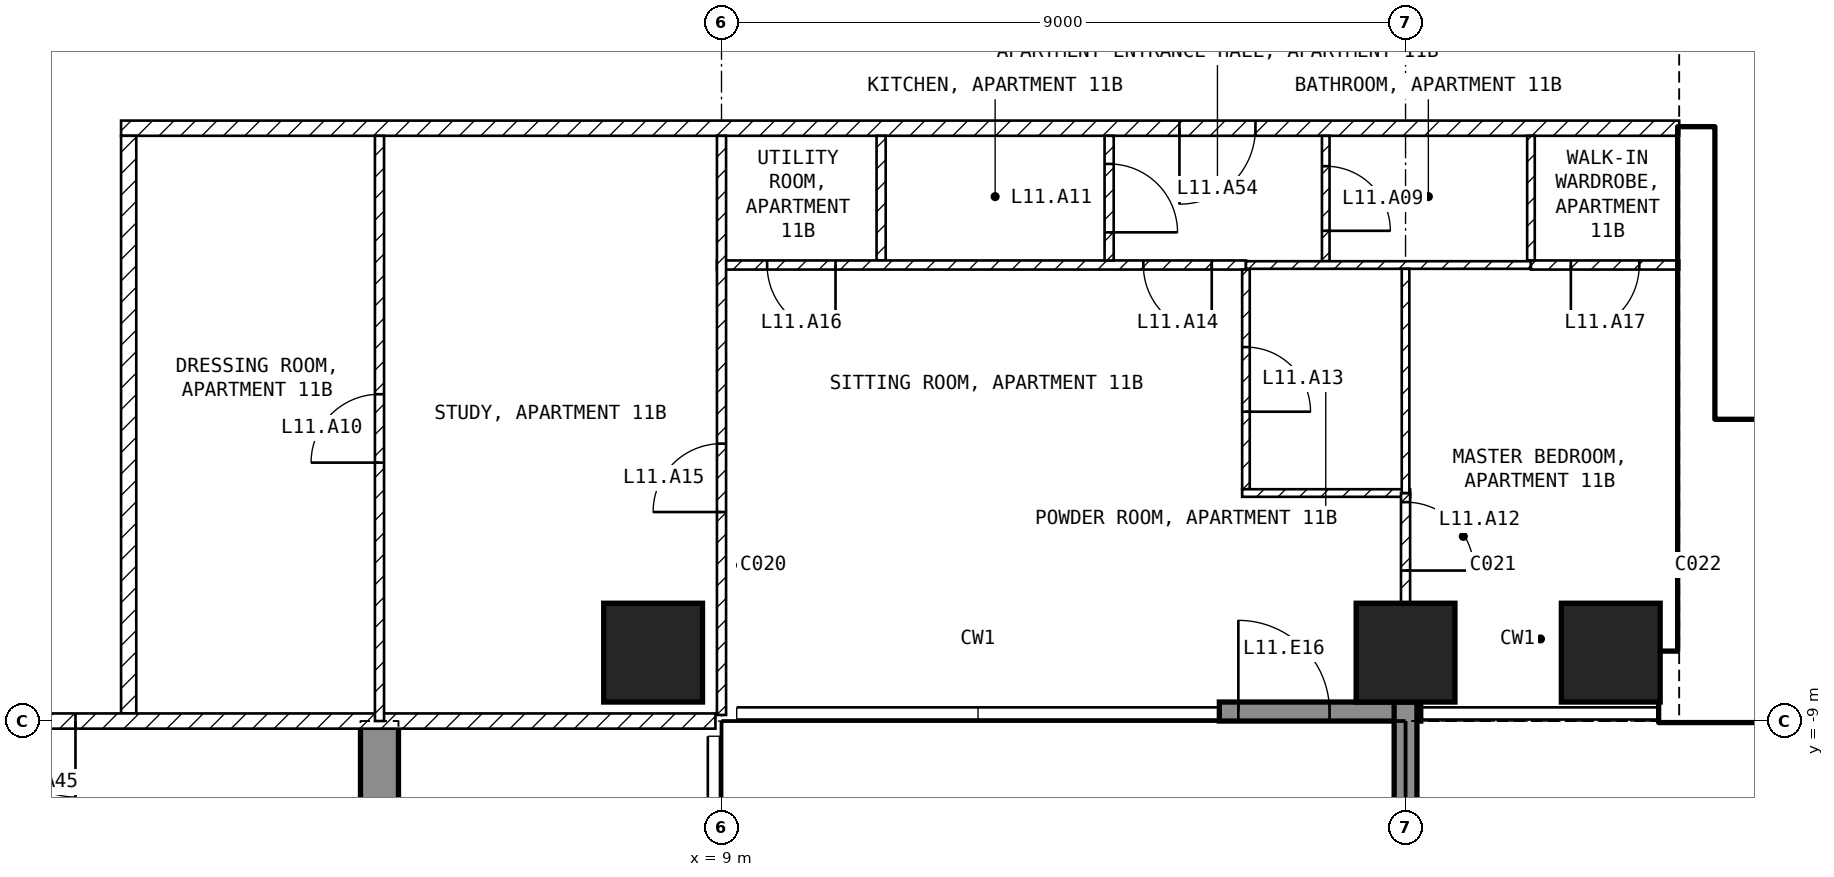
"""IFC4 building model, lengths in metres.
Left out: names, types, materials, properties, quantities, classifications, styles, units other than length and angle.
Written with IfcOpenShell. Run it as: python <this file> out.ifc"""

import sys

from ifc_helpers import new_model, si_unit, direction, frame, frame_2d, origin, origin_2d, place, context, subcontext, project, spatial, polyline, rectangle, outline, extrude, element, fill, save


model = new_model("IFC4")
c1 = context("Model", 3, precision=1e-05, world=origin(), true_north=direction((0.0, 1.0)))
c2 = subcontext(c1, "Body", "Model", "MODEL_VIEW")
j1 = project(units=[si_unit("LENGTHUNIT", "METRE"), si_unit("PLANEANGLEUNIT", "RADIAN")], contexts=[c1])
p1 = place(None, origin())
s1 = spatial("IfcSite", under=j1, at=p1, CompositionType="ELEMENT")
p2 = place(p1, origin())
s2 = spatial("IfcBuilding", under=s1, at=p2, CompositionType="ELEMENT")
p3 = place(p2, frame((0.0, 0.0, 57.5)))
s3 = spatial("IfcBuildingStorey", under=s2, at=p3, CompositionType="ELEMENT", Elevation=57.5)
for number, where, z_axis, x_axis in (
    (1, (8.1, -8.1, -0.25), (0.0, 0.0, 1.0), (1.0, 0.0, 0.0)),
    (2, (18.0, -8.1, -0.25), (0.0, 0.0, 1.0), (1.0, 0.0, 0.0)),
    (3, (20.7, -8.1, -0.25), (0.0, 0.0, 1.0), (1.0, 0.0, 0.0)),
):
    element("IfcColumn", number, at=place(p3, frame(where, z_axis=z_axis, x_axis=x_axis)), inside=s3, PredefinedType="COLUMN", context=c2, shape_type="SweptSolid", body=[
        extrude(rectangle(XDim=1.3, YDim=1.3, at=origin_2d()), origin(), (0.0, 0.0, 1.0), 3.5),
    ])
p4 = place(p3, frame((4.25, -25.45, -0.25), z_axis=(1.0, 0.0, 0.0), x_axis=(0.0, 1.0, 0.0)))
e4 = element("IfcWall", 4, at=p4, inside=s3, PredefinedType="SHEAR", context=c2, shape_type="SweptSolid", body=[
    extrude(outline(polyline([(0.0, 0.0), (4.15, 0.0), (4.15, 2.65), (6.55, 2.65), (6.55, 0.0), (11.95, 0.0), (11.95, 2.65), (14.35, 2.65), (14.35, 0.0), (16.45, 0.0), (16.45, 3.5), (0.0, 3.5), (0.0, 0.0)])), origin(), (0.0, 0.0, 1.0), 0.5),
])
p5 = place(p3, frame((15.55, -8.875, 0.0), z_axis=(0.0, 0.0, 1.0), x_axis=(1.0, 0.0, 0.0)))
e5 = element("IfcWall", 5, at=p5, inside=s3, PredefinedType="SOLIDWALL", context=c2, shape_type="SweptSolid", body=[
    extrude(rectangle(XDim=2.65, YDim=0.25, at=frame_2d((1.325, 0.0))), origin(), (0.0, 0.0, 1.0), 3.25),
])
p6 = place(p5, frame((0.25, 0.0, 0.0)))
e6 = element("IfcOpeningElement", 6, at=p6, cuts=e5, PredefinedType="OPENING", context=c2, shape_type="SweptSolid", body=[
    extrude(rectangle(XDim=1.2, YDim=2.4, at=frame_2d((0.6, 1.2))), frame((0.0, 0.135, 0.0), z_axis=(0.0, -1.0, 0.0), x_axis=(1.0, 0.0, 0.0)), (0.0, 0.0, 1.0), 0.27),
])
p7 = place(p3, frame((18.0, -8.75, 0.0), z_axis=(0.0, 0.0, 1.0), x_axis=(0.0, -1.0, 0.0)))
e7 = element("IfcWall", 7, at=p7, inside=s3, PredefinedType="SOLIDWALL", context=c2, shape_type="SweptSolid", body=[
    extrude(rectangle(XDim=2.95, YDim=0.3, at=frame_2d((1.475, 0.0))), origin(), (0.0, 0.0, 1.0), 3.25),
])
p8 = place(p3, frame((21.35, -8.55, 0.0), z_axis=(0.0, 0.0, 1.0), x_axis=(1.0, 0.0, 0.0)))
e8 = element("IfcWall", 8, at=p8, inside=s3, PredefinedType="SHEAR", context=c2, shape_type="SweptSolid", body=[
    extrude(rectangle(XDim=11.05, YDim=0.9, at=frame_2d((5.525, 0.0))), origin(), (0.0, 0.0, 1.0), 3.25),
])
p9 = place(p3, frame((21.825, -8.1, 0.0), z_axis=(0.0, 0.0, 1.0), x_axis=(0.0, 1.0, 0.0)))
e9 = element("IfcWall", 9, at=p9, inside=s3, PredefinedType="SHEAR", context=c2, shape_type="SweptSolid", body=[
    extrude(rectangle(XDim=6.9, YDim=0.45, at=frame_2d((3.45, 0.0))), origin(), (0.0, 0.0, 1.0), 3.25),
])
p10 = place(p3, frame((22.05, -5.15, 0.0), z_axis=(0.0, 0.0, 1.0), x_axis=(1.0, 0.0, 0.0)))
e10 = element("IfcWall", 10, at=p10, inside=s3, PredefinedType="SOLIDWALL", context=c2, shape_type="SweptSolid", body=[
    extrude(rectangle(XDim=6.3, YDim=0.2, at=frame_2d((3.15, 0.0))), origin(), (0.0, 0.0, 1.0), 3.25),
])
p11 = place(p10, frame((0.2, 0.0, 0.0)))
e11 = element("IfcOpeningElement", 11, at=p11, cuts=e10, PredefinedType="OPENING", context=c2, shape_type="SweptSolid", body=[
    extrude(rectangle(XDim=1.0, YDim=2.1, at=frame_2d((0.5, 1.05))), frame((0.0, 0.11, 0.0), z_axis=(0.0, -1.0, 0.0), x_axis=(1.0, 0.0, 0.0)), (0.0, 0.0, 1.0), 0.22),
])
p12 = place(p3, frame((21.6, -1.2, 0.0), z_axis=(0.0, 0.0, 1.0), x_axis=(-1.0, 0.0, 0.0)))
e12 = element("IfcWall", 12, at=p12, inside=s3, PredefinedType="PARTITIONING", context=c2, shape_type="SweptSolid", body=[
    extrude(rectangle(XDim=20.5, YDim=0.2, at=frame_2d((10.25, 0.0))), origin(), (0.0, 0.0, 1.0), 3.25),
])
p13 = place(p12, frame((5.575, 0.0, 0.0)))
e13 = element("IfcOpeningElement", 13, at=p13, cuts=e12, PredefinedType="OPENING", context=c2, shape_type="SweptSolid", body=[
    extrude(rectangle(XDim=1.0, YDim=2.1, at=frame_2d((0.5, 1.05))), frame((0.0, 0.11, 0.0), z_axis=(0.0, -1.0, 0.0), x_axis=(1.0, 0.0, 0.0)), (0.0, 0.0, 1.0), 0.22),
])
p14 = place(p3, frame((1.2, -1.3, 0.0), z_axis=(0.0, 0.0, 1.0), x_axis=(0.0, -1.0, 0.0)))
e14 = element("IfcWall", 14, at=p14, inside=s3, PredefinedType="PARTITIONING", context=c2, shape_type="SweptSolid", body=[
    extrude(rectangle(XDim=7.6, YDim=0.2, at=frame_2d((3.8, 0.0))), origin(), (0.0, 0.0, 1.0), 3.25),
])
p15 = place(p3, frame((8.92, -9.0, 0.0), z_axis=(0.0, 0.0, 1.0), x_axis=(-1.0, 0.0, 0.0)))
e15 = element("IfcWall", 15, at=p15, inside=s3, PredefinedType="PARTITIONING", context=c2, shape_type="SweptSolid", body=[
    extrude(rectangle(XDim=17.84, YDim=0.2, at=frame_2d((8.92, 0.0))), origin(), (0.0, 0.0, 1.0), 3.25),
])
p16 = place(p15, frame((8.42, 0.0, 0.0)))
e16 = element("IfcOpeningElement", 16, at=p16, cuts=e15, PredefinedType="OPENING", context=c2, shape_type="SweptSolid", body=[
    extrude(rectangle(XDim=1.0, YDim=2.1, at=frame_2d((0.5, 1.05))), frame((0.0, 0.11, 0.0), z_axis=(0.0, -1.0, 0.0), x_axis=(1.0, 0.0, 0.0)), (0.0, 0.0, 1.0), 0.22),
])
p17 = place(p3, frame((11.1, -1.3, 0.0), z_axis=(0.0, 0.0, 1.0), x_axis=(0.0, -1.0, 0.0)))
e17 = element("IfcWall", 17, at=p17, inside=s3, PredefinedType="PARTITIONING", context=c2, shape_type="SweptSolid", body=[
    extrude(rectangle(XDim=1.64, YDim=0.12, at=frame_2d((0.82, 0.0))), origin(), (0.0, 0.0, 1.0), 3.25),
])
p18 = place(p3, frame((15.9, -3.0, 0.0), z_axis=(0.0, 0.0, 1.0), x_axis=(-1.0, 0.0, 0.0)))
e18 = element("IfcWall", 18, at=p18, inside=s3, PredefinedType="PARTITIONING", context=c2, shape_type="SweptSolid", body=[
    extrude(rectangle(XDim=6.96, YDim=0.12, at=frame_2d((3.48, 0.0))), origin(), (0.0, 0.0, 1.0), 3.25),
])
p19 = place(p18, frame((0.45, 0.0, 0.0)))
e19 = element("IfcOpeningElement", 19, at=p19, cuts=e18, PredefinedType="OPENING", context=c2, shape_type="SweptSolid", body=[
    extrude(rectangle(XDim=0.9, YDim=2.1, at=frame_2d((0.45, 1.05))), frame((0.0, 0.07, 0.0), z_axis=(0.0, -1.0, 0.0), x_axis=(1.0, 0.0, 0.0)), (0.0, 0.0, 1.0), 0.14),
])
p20 = place(p18, frame((5.4, 0.0, 0.0)))
e20 = element("IfcOpeningElement", 20, at=p20, cuts=e18, PredefinedType="OPENING", context=c2, shape_type="SweptSolid", body=[
    extrude(rectangle(XDim=0.9, YDim=2.1, at=frame_2d((0.45, 1.05))), frame((0.0, 0.07, 0.0), z_axis=(0.0, -1.0, 0.0), x_axis=(1.0, 0.0, 0.0)), (0.0, 0.0, 1.0), 0.14),
])
p21 = place(p3, frame((9.0, -8.92, 0.0), z_axis=(0.0, 0.0, 1.0), x_axis=(0.0, 1.0, 0.0)))
e21 = element("IfcWall", 21, at=p21, inside=s3, PredefinedType="PARTITIONING", context=c2, shape_type="SweptSolid", body=[
    extrude(rectangle(XDim=7.62, YDim=0.12, at=frame_2d((3.81, 0.0))), origin(), (0.0, 0.0, 1.0), 3.25),
])
p22 = place(p21, frame((2.67, 0.0, 0.0)))
e22 = element("IfcOpeningElement", 22, at=p22, cuts=e21, PredefinedType="OPENING", context=c2, shape_type="SweptSolid", body=[
    extrude(rectangle(XDim=0.9, YDim=2.1, at=frame_2d((0.45, 1.05))), frame((0.0, 0.07, 0.0), z_axis=(0.0, -1.0, 0.0), x_axis=(1.0, 0.0, 0.0)), (0.0, 0.0, 1.0), 0.14),
])
p23 = place(p3, frame((14.1, -1.3, 0.0), z_axis=(0.0, 0.0, 1.0), x_axis=(0.0, -1.0, 0.0)))
e23 = element("IfcWall", 23, at=p23, inside=s3, PredefinedType="PARTITIONING", context=c2, shape_type="SweptSolid", body=[
    extrude(rectangle(XDim=1.64, YDim=0.12, at=frame_2d((0.82, 0.0))), origin(), (0.0, 0.0, 1.0), 3.25),
])
p24 = place(p23, frame((0.37, 0.0, 0.0)))
e24 = element("IfcOpeningElement", 24, at=p24, cuts=e23, PredefinedType="OPENING", context=c2, shape_type="SweptSolid", body=[
    extrude(rectangle(XDim=0.9, YDim=2.1, at=frame_2d((0.45, 1.05))), frame((0.0, 0.07, 0.0), z_axis=(0.0, -1.0, 0.0), x_axis=(1.0, 0.0, 0.0)), (0.0, 0.0, 1.0), 0.14),
])
p25 = place(p3, frame((16.95, -1.3, 0.0), z_axis=(0.0, 0.0, 1.0), x_axis=(0.0, -1.0, 0.0)))
e25 = element("IfcWall", 25, at=p25, inside=s3, PredefinedType="PARTITIONING", context=c2, shape_type="SweptSolid", body=[
    extrude(rectangle(XDim=1.65, YDim=0.1, at=frame_2d((0.825, 0.0))), origin(), (0.0, 0.0, 1.0), 3.25),
])
p26 = place(p25, frame((0.4, 0.0, 0.0)))
e26 = element("IfcOpeningElement", 26, at=p26, cuts=e25, PredefinedType="OPENING", context=c2, shape_type="SweptSolid", body=[
    extrude(rectangle(XDim=0.85, YDim=2.1, at=frame_2d((0.425, 1.05))), frame((0.0, 0.06, 0.0), z_axis=(0.0, -1.0, 0.0), x_axis=(1.0, 0.0, 0.0)), (0.0, 0.0, 1.0), 0.12),
])
p27 = place(p3, frame((19.65, -3.0, 0.0), z_axis=(0.0, 0.0, 1.0), x_axis=(-1.0, 0.0, 0.0)))
e27 = element("IfcWall", 27, at=p27, inside=s3, PredefinedType="PARTITIONING", context=c2, shape_type="SweptSolid", body=[
    extrude(rectangle(XDim=3.75, YDim=0.1, at=frame_2d((1.875, 0.0))), origin(), (0.0, 0.0, 1.0), 3.25),
])
p28 = place(p3, frame((19.65, -1.3, 0.0), z_axis=(0.0, 0.0, 1.0), x_axis=(0.0, -1.0, 0.0)))
e28 = element("IfcWall", 28, at=p28, inside=s3, PredefinedType="PARTITIONING", context=c2, shape_type="SweptSolid", body=[
    extrude(rectangle(XDim=1.64, YDim=0.1, at=frame_2d((0.82, 0.0))), origin(), (0.0, 0.0, 1.0), 3.25),
])
p29 = place(p3, frame((21.6, -3.0, 0.0), z_axis=(0.0, 0.0, 1.0), x_axis=(-1.0, 0.0, 0.0)))
e29 = element("IfcWall", 29, at=p29, inside=s3, PredefinedType="PARTITIONING", context=c2, shape_type="SweptSolid", body=[
    extrude(rectangle(XDim=1.95, YDim=0.12, at=frame_2d((0.975, 0.0))), origin(), (0.0, 0.0, 1.0), 3.25),
])
p30 = place(p29, frame((0.525, 0.0, 0.0)))
e30 = element("IfcOpeningElement", 30, at=p30, cuts=e29, PredefinedType="OPENING", context=c2, shape_type="SweptSolid", body=[
    extrude(rectangle(XDim=0.9, YDim=2.1, at=frame_2d((0.45, 1.05))), frame((0.0, 0.07, 0.0), z_axis=(0.0, -1.0, 0.0), x_axis=(1.0, 0.0, 0.0)), (0.0, 0.0, 1.0), 0.14),
])
p31 = place(p3, frame((15.9, -3.06, 0.0), z_axis=(0.0, 0.0, 1.0), x_axis=(0.0, -1.0, 0.0)))
e31 = element("IfcWall", 31, at=p31, inside=s3, PredefinedType="PARTITIONING", context=c2, shape_type="SweptSolid", body=[
    extrude(rectangle(XDim=2.89, YDim=0.1, at=frame_2d((1.445, 0.0))), origin(), (0.0, 0.0, 1.0), 3.25),
])
p32 = place(p31, frame((1.02, 0.0, 0.0)))
e32 = element("IfcOpeningElement", 32, at=p32, cuts=e31, PredefinedType="OPENING", context=c2, shape_type="SweptSolid", body=[
    extrude(rectangle(XDim=0.85, YDim=2.1, at=frame_2d((0.425, 1.05))), frame((0.0, 0.06, 0.0), z_axis=(0.0, -1.0, 0.0), x_axis=(1.0, 0.0, 0.0)), (0.0, 0.0, 1.0), 0.12),
])
p33 = place(p3, frame((15.85, -6.0, 0.0), z_axis=(0.0, 0.0, 1.0), x_axis=(1.0, 0.0, 0.0)))
e33 = element("IfcWall", 33, at=p33, inside=s3, PredefinedType="PARTITIONING", context=c2, shape_type="SweptSolid", body=[
    extrude(rectangle(XDim=2.21, YDim=0.1, at=frame_2d((1.105, 0.0))), origin(), (0.0, 0.0, 1.0), 3.25),
])
p34 = place(p3, frame((18.0, -6.0, 0.0), z_axis=(0.0, 0.0, 1.0), x_axis=(0.0, -1.0, 0.0)))
e34 = element("IfcWall", 34, at=p34, inside=s3, PredefinedType="PARTITIONING", context=c2, shape_type="SweptSolid", body=[
    extrude(rectangle(XDim=1.45, YDim=0.12, at=frame_2d((0.725, 0.0))), origin(), (0.0, 0.0, 1.0), 2.346),
])
p35 = place(p34, frame((0.12, 0.0, 0.0)))
e35 = element("IfcOpeningElement", 35, at=p35, cuts=e34, PredefinedType="OPENING", context=c2, shape_type="SweptSolid", body=[
    extrude(rectangle(XDim=0.9, YDim=2.1, at=frame_2d((0.45, 1.05))), frame((0.0, 0.07, 0.0), z_axis=(0.0, -1.0, 0.0), x_axis=(1.0, 0.0, 0.0)), (0.0, 0.0, 1.0), 0.14),
])
p36 = place(p3, frame((18.0, -3.05, 0.0), z_axis=(0.0, 0.0, 1.0), x_axis=(0.0, -1.0, 0.0)))
e36 = element("IfcWall", 36, at=p36, inside=s3, PredefinedType="PARTITIONING", context=c2, shape_type="SweptSolid", body=[
    extrude(rectangle(XDim=2.95, YDim=0.1, at=frame_2d((1.475, 0.0))), origin(), (0.0, 0.0, 1.0), 2.346),
])
p37 = place(p3, frame((4.5, -9.0, 0.0), z_axis=(0.0, 0.0, 1.0), x_axis=(0.0, 1.0, 0.0)))
e37 = element("IfcWall", 37, at=p37, inside=s3, PredefinedType="PARTITIONING", context=c2, shape_type="SweptSolid", body=[
    extrude(rectangle(XDim=7.7, YDim=0.12, at=frame_2d((3.85, 0.0))), origin(), (0.0, 0.0, 1.0), 3.25),
])
p38 = place(p37, frame((3.4, 0.0, 0.0)))
e38 = element("IfcOpeningElement", 38, at=p38, cuts=e37, PredefinedType="OPENING", context=c2, shape_type="SweptSolid", body=[
    extrude(rectangle(XDim=0.9, YDim=2.1, at=frame_2d((0.45, 1.05))), frame((0.0, 0.07, 0.0), z_axis=(0.0, -1.0, 0.0), x_axis=(1.0, 0.0, 0.0)), (0.0, 0.0, 1.0), 0.14),
])
p39 = place(p6, origin())
e39 = element("IfcDoor", 39, at=p39, inside=s3, OperationType="SINGLE_SWING_LEFT", PredefinedType="DOOR", context=c2, shape_type="SweptSolid", body=[
    extrude(rectangle(XDim=1.2, YDim=2.4, at=frame_2d((0.6, 1.2))), frame((0.0, 0.025, 0.0), z_axis=(0.0, -1.0, 0.0), x_axis=(1.0, 0.0, 0.0)), (0.0, 0.0, 1.0), 0.05),
])
fill(e6, e39)
p40 = place(p11, origin())
e40 = element("IfcDoor", 40, at=p40, inside=s3, OperationType="SINGLE_SWING_LEFT", PredefinedType="DOOR", context=c2, shape_type="SweptSolid", body=[
    extrude(rectangle(XDim=1.0, YDim=2.1, at=frame_2d((0.5, 1.05))), frame((0.0, 0.025, 0.0), z_axis=(0.0, -1.0, 0.0), x_axis=(1.0, 0.0, 0.0)), (0.0, 0.0, 1.0), 0.05),
])
fill(e11, e40)
p41 = place(p26, origin())
e41 = element("IfcDoor", 41, at=p41, inside=s3, OperationType="SINGLE_SWING_RIGHT", PredefinedType="DOOR", context=c2, shape_type="SweptSolid", body=[
    extrude(rectangle(XDim=0.85, YDim=2.1, at=frame_2d((0.425, 1.05))), frame((0.0, 0.025, 0.0), z_axis=(0.0, -1.0, 0.0), x_axis=(1.0, 0.0, 0.0)), (0.0, 0.0, 1.0), 0.05),
])
fill(e26, e41)
p42 = place(p38, origin())
e42 = element("IfcDoor", 42, at=p42, inside=s3, OperationType="SINGLE_SWING_LEFT", PredefinedType="DOOR", context=c2, shape_type="SweptSolid", body=[
    extrude(rectangle(XDim=0.9, YDim=2.1, at=frame_2d((0.45, 1.05))), frame((0.0, 0.025, 0.0), z_axis=(0.0, -1.0, 0.0), x_axis=(1.0, 0.0, 0.0)), (0.0, 0.0, 1.0), 0.05),
])
fill(e38, e42)
p43 = place(p24, origin())
e43 = element("IfcDoor", 43, at=p43, inside=s3, OperationType="SINGLE_SWING_RIGHT", PredefinedType="DOOR", context=c2, shape_type="SweptSolid", body=[
    extrude(rectangle(XDim=0.9, YDim=2.1, at=frame_2d((0.45, 1.05))), frame((0.0, 0.025, 0.0), z_axis=(0.0, -1.0, 0.0), x_axis=(1.0, 0.0, 0.0)), (0.0, 0.0, 1.0), 0.05),
])
fill(e24, e43)
p44 = place(p35, origin())
e44 = element("IfcDoor", 44, at=p44, inside=s3, OperationType="SINGLE_SWING_RIGHT", PredefinedType="DOOR", context=c2, shape_type="SweptSolid", body=[
    extrude(rectangle(XDim=0.9, YDim=2.1, at=frame_2d((0.45, 1.05))), frame((0.0, 0.025, 0.0), z_axis=(0.0, -1.0, 0.0), x_axis=(1.0, 0.0, 0.0)), (0.0, 0.0, 1.0), 0.05),
])
fill(e35, e44)
p45 = place(p32, origin())
e45 = element("IfcDoor", 45, at=p45, inside=s3, OperationType="SINGLE_SWING_RIGHT", PredefinedType="DOOR", context=c2, shape_type="SweptSolid", body=[
    extrude(rectangle(XDim=0.85, YDim=2.1, at=frame_2d((0.425, 1.05))), frame((0.0, 0.025, 0.0), z_axis=(0.0, -1.0, 0.0), x_axis=(1.0, 0.0, 0.0)), (0.0, 0.0, 1.0), 0.05),
])
fill(e32, e45)
p46 = place(p19, origin())
e46 = element("IfcDoor", 46, at=p46, inside=s3, OperationType="SINGLE_SWING_LEFT", PredefinedType="DOOR", context=c2, shape_type="SweptSolid", body=[
    extrude(rectangle(XDim=0.9, YDim=2.1, at=frame_2d((0.45, 1.05))), frame((0.0, 0.025, 0.0), z_axis=(0.0, -1.0, 0.0), x_axis=(1.0, 0.0, 0.0)), (0.0, 0.0, 1.0), 0.05),
])
fill(e19, e46)
p47 = place(p22, origin())
e47 = element("IfcDoor", 47, at=p47, inside=s3, OperationType="SINGLE_SWING_LEFT", PredefinedType="DOOR", context=c2, shape_type="SweptSolid", body=[
    extrude(rectangle(XDim=0.9, YDim=2.1, at=frame_2d((0.45, 1.05))), frame((0.0, 0.025, 0.0), z_axis=(0.0, -1.0, 0.0), x_axis=(1.0, 0.0, 0.0)), (0.0, 0.0, 1.0), 0.05),
])
fill(e22, e47)
p48 = place(p20, origin())
e48 = element("IfcDoor", 48, at=p48, inside=s3, OperationType="SINGLE_SWING_LEFT", PredefinedType="DOOR", context=c2, shape_type="SweptSolid", body=[
    extrude(rectangle(XDim=0.9, YDim=2.1, at=frame_2d((0.45, 1.05))), frame((0.0, 0.025, 0.0), z_axis=(0.0, -1.0, 0.0), x_axis=(1.0, 0.0, 0.0)), (0.0, 0.0, 1.0), 0.05),
])
fill(e20, e48)
p49 = place(p30, origin())
e49 = element("IfcDoor", 49, at=p49, inside=s3, OperationType="SINGLE_SWING_RIGHT", PredefinedType="DOOR", context=c2, shape_type="SweptSolid", body=[
    extrude(rectangle(XDim=0.9, YDim=2.1, at=frame_2d((0.45, 1.05))), frame((0.0, 0.025, 0.0), z_axis=(0.0, -1.0, 0.0), x_axis=(1.0, 0.0, 0.0)), (0.0, 0.0, 1.0), 0.05),
])
fill(e30, e49)
p50 = place(p16, origin())
e50 = element("IfcDoor", 50, at=p50, inside=s3, OperationType="SINGLE_SWING_LEFT", PredefinedType="DOOR", context=c2, shape_type="SweptSolid", body=[
    extrude(rectangle(XDim=1.0, YDim=2.1, at=frame_2d((0.5, 1.05))), frame((0.0, 0.025, 0.0), z_axis=(0.0, -1.0, 0.0), x_axis=(1.0, 0.0, 0.0)), (0.0, 0.0, 1.0), 0.05),
])
fill(e16, e50)
p51 = place(p13, origin())
e51 = element("IfcDoor", 51, at=p51, inside=s3, OperationType="SINGLE_SWING_RIGHT", PredefinedType="DOOR", context=c2, shape_type="SweptSolid", body=[
    extrude(rectangle(XDim=1.0, YDim=2.1, at=frame_2d((0.5, 1.05))), frame((0.0, 0.025, 0.0), z_axis=(0.0, -1.0, 0.0), x_axis=(1.0, 0.0, 0.0)), (0.0, 0.0, 1.0), 0.05),
])
fill(e13, e51)
save(model, sys.argv[1])
